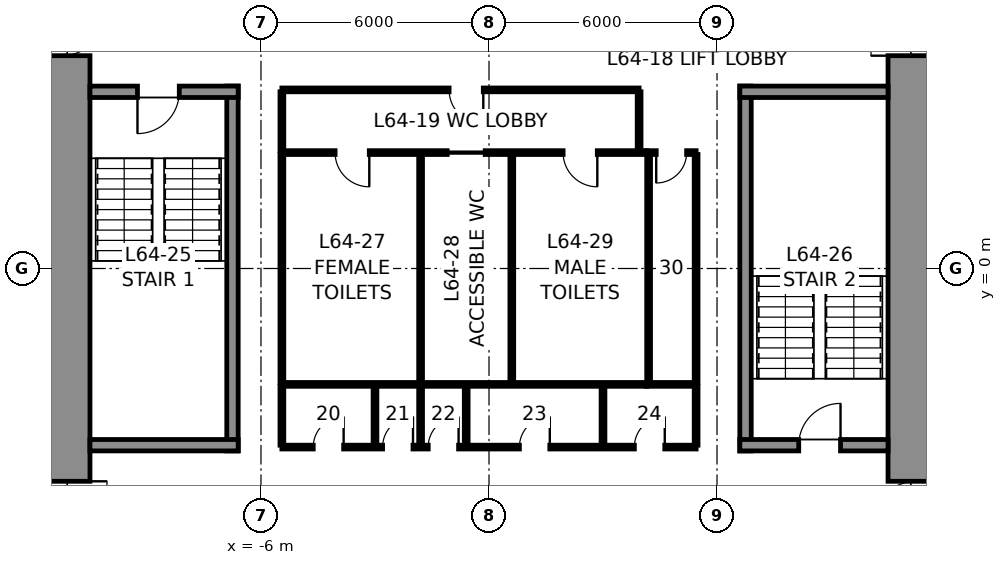
"""IFC4 building model, lengths in metres.
Left out: names, types, materials, properties, quantities, classifications, styles, units other than length and angle.
Written with IfcOpenShell. Run it as: python <this file> out.ifc"""

import sys

from ifc_helpers import new_model, si_unit, direction, frame, frame_2d, origin, place, context, subcontext, project, spatial, rectangle, extrude, element, fill, save


model = new_model("IFC4")
c1 = context("Model", 3, precision=1e-05, world=origin(), true_north=direction((0.0, 1.0)))
c2 = subcontext(c1, "Body", "Model", "MODEL_VIEW")
j1 = project(units=[si_unit("LENGTHUNIT", "METRE"), si_unit("PLANEANGLEUNIT", "RADIAN")], contexts=[c1])
p1 = place(None, origin())
s1 = spatial("IfcSite", under=j1, at=p1, CompositionType="ELEMENT")
p2 = place(p1, origin())
s2 = spatial("IfcBuilding", under=s1, at=p2, CompositionType="ELEMENT")
p3 = place(p2, frame((0.0, 0.0, 285.8)))
s3 = spatial("IfcBuildingStorey", under=s2, at=p3, CompositionType="ELEMENT", Elevation=285.8)
p4 = place(p3, frame((11.25, 10.5, 0.0), z_axis=(0.0, 0.0, 1.0), x_axis=(0.0, -1.0, 0.0)))
e1 = element("IfcWall", 1, at=p4, inside=s3, PredefinedType="SHEAR", context=c2, shape_type="SweptSolid", body=[
    extrude(rectangle(XDim=21.0, YDim=1.5, at=frame_2d((10.5, 0.0))), origin(), (0.0, 0.0, 1.0), 4.0),
])
p5 = place(p4, frame((3.7, 0.0, 0.0)))
e2 = element("IfcOpeningElement", 2, at=p5, cuts=e1, PredefinedType="OPENING", context=c2, shape_type="SweptSolid", body=[
    extrude(rectangle(XDim=1.2, YDim=2.3, at=frame_2d((0.6, 1.15))), frame((0.0, 0.76, 0.0), z_axis=(0.0, -1.0, 0.0), x_axis=(1.0, 0.0, 0.0)), (0.0, 0.0, 1.0), 1.52),
])
p6 = place(p4, frame((16.1, 0.0, 0.0)))
e3 = element("IfcOpeningElement", 3, at=p6, cuts=e1, PredefinedType="OPENING", context=c2, shape_type="SweptSolid", body=[
    extrude(rectangle(XDim=1.2, YDim=2.3, at=frame_2d((0.6, 1.15))), frame((0.0, 0.76, 0.0), z_axis=(0.0, -1.0, 0.0), x_axis=(1.0, 0.0, 0.0)), (0.0, 0.0, 1.0), 1.52),
])
p7 = place(p3, frame((-11.25, -10.5, 0.0), z_axis=(0.0, 0.0, 1.0), x_axis=(0.0, 1.0, 0.0)))
e4 = element("IfcWall", 4, at=p7, inside=s3, PredefinedType="SHEAR", context=c2, shape_type="SweptSolid", body=[
    extrude(rectangle(XDim=21.0, YDim=1.5, at=frame_2d((10.5, 0.0))), origin(), (0.0, 0.0, 1.0), 4.0),
])
p8 = place(p7, frame((16.1, 0.0, 0.0)))
e5 = element("IfcOpeningElement", 5, at=p8, cuts=e4, PredefinedType="OPENING", context=c2, shape_type="SweptSolid", body=[
    extrude(rectangle(XDim=1.2, YDim=2.3, at=frame_2d((0.6, 1.15))), frame((0.0, 0.76, 0.0), z_axis=(0.0, -1.0, 0.0), x_axis=(1.0, 0.0, 0.0)), (0.0, 0.0, 1.0), 1.52),
])
p9 = place(p7, frame((3.7, 0.0, 0.0)))
e6 = element("IfcOpeningElement", 6, at=p9, cuts=e4, PredefinedType="OPENING", context=c2, shape_type="SweptSolid", body=[
    extrude(rectangle(XDim=1.2, YDim=2.3, at=frame_2d((0.6, 1.15))), frame((0.0, 0.76, 0.0), z_axis=(0.0, -1.0, 0.0), x_axis=(1.0, 0.0, 0.0)), (0.0, 0.0, 1.0), 1.52),
])
p10 = place(p3, frame((-6.75, -4.8, 0.0), z_axis=(0.0, 0.0, 1.0), x_axis=(0.0, 1.0, 0.0)))
e7 = element("IfcWall", 7, at=p10, inside=s3, PredefinedType="SOLIDWALL", context=c2, shape_type="SweptSolid", body=[
    extrude(rectangle(XDim=9.6, YDim=0.3, at=frame_2d((4.8, 0.0))), origin(), (0.0, 0.0, 1.0), 3.75),
])
p11 = place(p3, frame((-10.5, 4.65, 0.0), z_axis=(0.0, 0.0, 1.0), x_axis=(1.0, 0.0, 0.0)))
e8 = element("IfcWall", 8, at=p11, inside=s3, PredefinedType="SOLIDWALL", context=c2, shape_type="SweptSolid", body=[
    extrude(rectangle(XDim=3.9, YDim=0.3, at=frame_2d((1.95, 0.0))), origin(), (0.0, 0.0, 1.0), 3.75),
])
p12 = place(p11, frame((1.25, 0.0, 0.0)))
e9 = element("IfcOpeningElement", 9, at=p12, cuts=e8, PredefinedType="OPENING", context=c2, shape_type="SweptSolid", body=[
    extrude(rectangle(XDim=1.1, YDim=2.3, at=frame_2d((0.55, 1.15))), frame((0.0, 0.16, 0.0), z_axis=(0.0, -1.0, 0.0), x_axis=(1.0, 0.0, 0.0)), (0.0, 0.0, 1.0), 0.32),
])
p13 = place(p3, frame((-6.6, -4.65, 0.0), z_axis=(0.0, 0.0, 1.0), x_axis=(-1.0, 0.0, 0.0)))
e10 = element("IfcWall", 10, at=p13, inside=s3, PredefinedType="SOLIDWALL", context=c2, shape_type="SweptSolid", body=[
    extrude(rectangle(XDim=3.9, YDim=0.3, at=frame_2d((1.95, 0.0))), origin(), (0.0, 0.0, 1.0), 3.75),
])
p14 = place(p3, frame((6.75, -4.8, 0.0), z_axis=(0.0, 0.0, 1.0), x_axis=(0.0, 1.0, 0.0)))
e11 = element("IfcWall", 11, at=p14, inside=s3, PredefinedType="SOLIDWALL", context=c2, shape_type="SweptSolid", body=[
    extrude(rectangle(XDim=9.6, YDim=0.3, at=frame_2d((4.8, 0.0))), origin(), (0.0, 0.0, 1.0), 3.75),
])
p15 = place(p3, frame((6.6, 4.65, 0.0), z_axis=(0.0, 0.0, 1.0), x_axis=(1.0, 0.0, 0.0)))
e12 = element("IfcWall", 12, at=p15, inside=s3, PredefinedType="SOLIDWALL", context=c2, shape_type="SweptSolid", body=[
    extrude(rectangle(XDim=3.9, YDim=0.3, at=frame_2d((1.95, 0.0))), origin(), (0.0, 0.0, 1.0), 3.75),
])
p16 = place(p3, frame((10.5, -4.65, 0.0), z_axis=(0.0, 0.0, 1.0), x_axis=(-1.0, 0.0, 0.0)))
e13 = element("IfcWall", 13, at=p16, inside=s3, PredefinedType="SOLIDWALL", context=c2, shape_type="SweptSolid", body=[
    extrude(rectangle(XDim=3.9, YDim=0.3, at=frame_2d((1.95, 0.0))), origin(), (0.0, 0.0, 1.0), 3.75),
])
p17 = place(p16, frame((1.25, 0.0, 0.0)))
e14 = element("IfcOpeningElement", 14, at=p17, cuts=e13, PredefinedType="OPENING", context=c2, shape_type="SweptSolid", body=[
    extrude(rectangle(XDim=1.1, YDim=2.3, at=frame_2d((0.55, 1.15))), frame((0.0, 0.16, 0.0), z_axis=(0.0, -1.0, 0.0), x_axis=(1.0, 0.0, 0.0)), (0.0, 0.0, 1.0), 0.32),
])
p18 = place(p3, frame((-5.45, 3.05, 0.0), z_axis=(0.0, 0.0, 1.0), x_axis=(1.0, 0.0, 0.0)))
e15 = element("IfcWall", 15, at=p18, inside=s3, PredefinedType="PARTITIONING", context=c2, shape_type="SweptSolid", body=[
    extrude(rectangle(XDim=9.6, YDim=0.1, at=frame_2d((4.8, 0.0))), origin(), (0.0, 0.0, 1.0), 3.75),
])
p19 = place(p18, frame((1.4, 0.0, 0.0)))
e16 = element("IfcOpeningElement", 16, at=p19, cuts=e15, PredefinedType="OPENING", context=c2, shape_type="SweptSolid", body=[
    extrude(rectangle(XDim=0.9, YDim=2.3, at=frame_2d((0.45, 1.15))), frame((0.0, 0.06, 0.0), z_axis=(0.0, -1.0, 0.0), x_axis=(1.0, 0.0, 0.0)), (0.0, 0.0, 1.0), 0.12),
])
p20 = place(p18, frame((4.35, 0.0, 0.0)))
e17 = element("IfcOpeningElement", 17, at=p20, cuts=e15, PredefinedType="OPENING", context=c2, shape_type="SweptSolid", body=[
    extrude(rectangle(XDim=1.0, YDim=2.3, at=frame_2d((0.5, 1.15))), frame((0.0, 0.06, 0.0), z_axis=(0.0, -1.0, 0.0), x_axis=(1.0, 0.0, 0.0)), (0.0, 0.0, 1.0), 0.12),
])
p21 = place(p18, frame((7.4, 0.0, 0.0)))
e18 = element("IfcOpeningElement", 18, at=p21, cuts=e15, PredefinedType="OPENING", context=c2, shape_type="SweptSolid", body=[
    extrude(rectangle(XDim=0.9, YDim=2.3, at=frame_2d((0.45, 1.15))), frame((0.0, 0.06, 0.0), z_axis=(0.0, -1.0, 0.0), x_axis=(1.0, 0.0, 0.0)), (0.0, 0.0, 1.0), 0.12),
])
p22 = place(p3, frame((4.15, 3.05, 0.0), z_axis=(0.0, 0.0, 1.0), x_axis=(1.0, 0.0, 0.0)))
e19 = element("IfcWall", 19, at=p22, inside=s3, PredefinedType="PARTITIONING", context=c2, shape_type="SweptSolid", body=[
    extrude(rectangle(XDim=1.3, YDim=0.1, at=frame_2d((0.65, 0.0))), origin(), (0.0, 0.0, 1.0), 3.75),
])
p23 = place(p22, frame((0.25, 0.0, 0.0)))
e20 = element("IfcOpeningElement", 20, at=p23, cuts=e19, PredefinedType="OPENING", context=c2, shape_type="SweptSolid", body=[
    extrude(rectangle(XDim=0.8, YDim=2.3, at=frame_2d((0.4, 1.15))), frame((0.0, 0.06, 0.0), z_axis=(0.0, -1.0, 0.0), x_axis=(1.0, 0.0, 0.0)), (0.0, 0.0, 1.0), 0.12),
])
p24 = place(p3, frame((4.15, -3.05, 0.0), z_axis=(0.0, 0.0, 1.0), x_axis=(-1.0, 0.0, 0.0)))
e21 = element("IfcWall", 21, at=p24, inside=s3, PredefinedType="PARTITIONING", context=c2, shape_type="SweptSolid", body=[
    extrude(rectangle(XDim=9.6, YDim=0.1, at=frame_2d((4.8, 0.0))), origin(), (0.0, 0.0, 1.0), 3.75),
])
p25 = place(p3, frame((5.45, -3.05, 0.0), z_axis=(0.0, 0.0, 1.0), x_axis=(-1.0, 0.0, 0.0)))
e22 = element("IfcWall", 22, at=p25, inside=s3, PredefinedType="PARTITIONING", context=c2, shape_type="SweptSolid", body=[
    extrude(rectangle(XDim=1.3, YDim=0.1, at=frame_2d((0.65, 0.0))), origin(), (0.0, 0.0, 1.0), 3.75),
])
for number, where, z_axis, x_axis in (
    (23, (5.45, 3.0, 0.0), (0.0, 0.0, 1.0), (0.0, -1.0, 0.0)),
    (24, (-5.45, -3.0, 0.0), (0.0, 0.0, 1.0), (0.0, 1.0, 0.0)),
    (25, (-1.8, -3.0, 0.0), (0.0, 0.0, 1.0), (0.0, 1.0, 0.0)),
    (26, (0.6, -3.0, 0.0), (0.0, 0.0, 1.0), (0.0, 1.0, 0.0)),
    (27, (4.2, -3.0, 0.0), (0.0, 0.0, 1.0), (0.0, 1.0, 0.0)),
):
    element("IfcWall", number, at=place(p3, frame(where, z_axis=z_axis, x_axis=x_axis)), inside=s3, PredefinedType="PARTITIONING", context=c2, shape_type="SweptSolid", body=[
        extrude(rectangle(XDim=6.0, YDim=0.1, at=frame_2d((3.0, 0.0))), origin(), (0.0, 0.0, 1.0), 3.75),
    ])
p26 = place(p3, frame((-5.45, 4.7, 0.0), z_axis=(0.0, 0.0, 1.0), x_axis=(1.0, 0.0, 0.0)))
e28 = element("IfcWall", 28, at=p26, inside=s3, PredefinedType="PARTITIONING", context=c2, shape_type="SweptSolid", body=[
    extrude(rectangle(XDim=9.4, YDim=0.1, at=frame_2d((4.7, 0.0))), origin(), (0.0, 0.0, 1.0), 3.75),
])
p27 = place(p26, frame((4.4, 0.0, 0.0)))
e29 = element("IfcOpeningElement", 29, at=p27, cuts=e28, PredefinedType="OPENING", context=c2, shape_type="SweptSolid", body=[
    extrude(rectangle(XDim=0.9, YDim=2.3, at=frame_2d((0.45, 1.15))), frame((0.0, 0.06, 0.0), z_axis=(0.0, -1.0, 0.0), x_axis=(1.0, 0.0, 0.0)), (0.0, 0.0, 1.0), 0.12),
])
for number, where, z_axis, x_axis in (
    (30, (-5.45, 3.1, 0.0), (0.0, 0.0, 1.0), (0.0, 1.0, 0.0)),
    (31, (3.95, 3.1, 0.0), (0.0, 0.0, 1.0), (0.0, 1.0, 0.0)),
):
    element("IfcWall", number, at=place(p3, frame(where, z_axis=z_axis, x_axis=x_axis)), inside=s3, PredefinedType="PARTITIONING", context=c2, shape_type="SweptSolid", body=[
        extrude(rectangle(XDim=1.55, YDim=0.1, at=frame_2d((0.775, 0.0))), origin(), (0.0, 0.0, 1.0), 3.75),
    ])
p28 = place(p3, frame((5.45, -4.7, 0.0), z_axis=(0.0, 0.0, 1.0), x_axis=(-1.0, 0.0, 0.0)))
e32 = element("IfcWall", 32, at=p28, inside=s3, PredefinedType="PARTITIONING", context=c2, shape_type="SweptSolid", body=[
    extrude(rectangle(XDim=10.9, YDim=0.1, at=frame_2d((5.45, 0.0))), origin(), (0.0, 0.0, 1.0), 3.75),
])
p29 = place(p28, frame((9.275, 0.0, 0.0)))
e33 = element("IfcOpeningElement", 33, at=p29, cuts=e32, PredefinedType="OPENING", context=c2, shape_type="SweptSolid", body=[
    extrude(rectangle(XDim=0.8, YDim=2.3, at=frame_2d((0.4, 1.15))), frame((0.0, 0.06, 0.0), z_axis=(0.0, -1.0, 0.0), x_axis=(1.0, 0.0, 0.0)), (0.0, 0.0, 1.0), 0.12),
])
p30 = place(p28, frame((7.45, 0.0, 0.0)))
e34 = element("IfcOpeningElement", 34, at=p30, cuts=e32, PredefinedType="OPENING", context=c2, shape_type="SweptSolid", body=[
    extrude(rectangle(XDim=0.8, YDim=2.3, at=frame_2d((0.4, 1.15))), frame((0.0, 0.06, 0.0), z_axis=(0.0, -1.0, 0.0), x_axis=(1.0, 0.0, 0.0)), (0.0, 0.0, 1.0), 0.12),
])
p31 = place(p28, frame((6.25, 0.0, 0.0)))
e35 = element("IfcOpeningElement", 35, at=p31, cuts=e32, PredefinedType="OPENING", context=c2, shape_type="SweptSolid", body=[
    extrude(rectangle(XDim=0.8, YDim=2.3, at=frame_2d((0.4, 1.15))), frame((0.0, 0.06, 0.0), z_axis=(0.0, -1.0, 0.0), x_axis=(1.0, 0.0, 0.0)), (0.0, 0.0, 1.0), 0.12),
])
p32 = place(p28, frame((3.85, 0.0, 0.0)))
e36 = element("IfcOpeningElement", 36, at=p32, cuts=e32, PredefinedType="OPENING", context=c2, shape_type="SweptSolid", body=[
    extrude(rectangle(XDim=0.8, YDim=2.3, at=frame_2d((0.4, 1.15))), frame((0.0, 0.06, 0.0), z_axis=(0.0, -1.0, 0.0), x_axis=(1.0, 0.0, 0.0)), (0.0, 0.0, 1.0), 0.12),
])
p33 = place(p28, frame((0.825, 0.0, 0.0)))
e37 = element("IfcOpeningElement", 37, at=p33, cuts=e32, PredefinedType="OPENING", context=c2, shape_type="SweptSolid", body=[
    extrude(rectangle(XDim=0.8, YDim=2.3, at=frame_2d((0.4, 1.15))), frame((0.0, 0.06, 0.0), z_axis=(0.0, -1.0, 0.0), x_axis=(1.0, 0.0, 0.0)), (0.0, 0.0, 1.0), 0.12),
])
for number, where, z_axis, x_axis in (
    (38, (-5.45, -3.1, 0.0), (0.0, 0.0, 1.0), (0.0, -1.0, 0.0)),
    (39, (5.45, -3.1, 0.0), (0.0, 0.0, 1.0), (0.0, -1.0, 0.0)),
    (40, (-3.0, -3.1, 0.0), (0.0, 0.0, 1.0), (0.0, -1.0, 0.0)),
    (41, (-1.8, -3.1, 0.0), (0.0, 0.0, 1.0), (0.0, -1.0, 0.0)),
    (42, (-0.6, -3.1, 0.0), (0.0, 0.0, 1.0), (0.0, -1.0, 0.0)),
    (43, (3.0, -3.1, 0.0), (0.0, 0.0, 1.0), (0.0, -1.0, 0.0)),
):
    element("IfcWall", number, at=place(p3, frame(where, z_axis=z_axis, x_axis=x_axis)), inside=s3, PredefinedType="PARTITIONING", context=c2, shape_type="SweptSolid", body=[
        extrude(rectangle(XDim=1.55, YDim=0.1, at=frame_2d((0.775, 0.0))), origin(), (0.0, 0.0, 1.0), 3.75),
    ])
p34 = place(p12, frame((1.1, 0.0, 0.0), z_axis=(0.0, 0.0, 1.0), x_axis=(-1.0, 0.0, 0.0)))
e44 = element("IfcDoor", 44, at=p34, inside=s3, OperationType="SINGLE_SWING_RIGHT", PredefinedType="DOOR", context=c2, shape_type="SweptSolid", body=[
    extrude(rectangle(XDim=1.1, YDim=2.3, at=frame_2d((0.55, 1.15))), frame((0.0, 0.025, 0.0), z_axis=(0.0, -1.0, 0.0), x_axis=(1.0, 0.0, 0.0)), (0.0, 0.0, 1.0), 0.05),
])
fill(e9, e44)
p35 = place(p17, frame((1.1, 0.0, 0.0), z_axis=(0.0, 0.0, 1.0), x_axis=(-1.0, 0.0, 0.0)))
e45 = element("IfcDoor", 45, at=p35, inside=s3, OperationType="SINGLE_SWING_RIGHT", PredefinedType="DOOR", context=c2, shape_type="SweptSolid", body=[
    extrude(rectangle(XDim=1.1, YDim=2.3, at=frame_2d((0.55, 1.15))), frame((0.0, 0.025, 0.0), z_axis=(0.0, -1.0, 0.0), x_axis=(1.0, 0.0, 0.0)), (0.0, 0.0, 1.0), 0.05),
])
fill(e14, e45)
p36 = place(p19, frame((0.9, 0.0, 0.0), z_axis=(0.0, 0.0, 1.0), x_axis=(-1.0, 0.0, 0.0)))
e46 = element("IfcDoor", 46, at=p36, inside=s3, OperationType="SINGLE_SWING_LEFT", PredefinedType="DOOR", context=c2, shape_type="SweptSolid", body=[
    extrude(rectangle(XDim=0.9, YDim=2.3, at=frame_2d((0.45, 1.15))), frame((0.0, 0.025, 0.0), z_axis=(0.0, -1.0, 0.0), x_axis=(1.0, 0.0, 0.0)), (0.0, 0.0, 1.0), 0.05),
])
fill(e16, e46)
p37 = place(p20, frame((1.0, 0.0, 0.0), z_axis=(0.0, 0.0, 1.0), x_axis=(-1.0, 0.0, 0.0)))
e47 = element("IfcDoor", 47, at=p37, inside=s3, OperationType="SLIDING_TO_LEFT", PredefinedType="DOOR", context=c2, shape_type="SweptSolid", body=[
    extrude(rectangle(XDim=1.0, YDim=2.3, at=frame_2d((0.5, 1.15))), frame((0.0, 0.025, 0.0), z_axis=(0.0, -1.0, 0.0), x_axis=(1.0, 0.0, 0.0)), (0.0, 0.0, 1.0), 0.05),
])
fill(e17, e47)
p38 = place(p21, frame((0.9, 0.0, 0.0), z_axis=(0.0, 0.0, 1.0), x_axis=(-1.0, 0.0, 0.0)))
e48 = element("IfcDoor", 48, at=p38, inside=s3, OperationType="SINGLE_SWING_LEFT", PredefinedType="DOOR", context=c2, shape_type="SweptSolid", body=[
    extrude(rectangle(XDim=0.9, YDim=2.3, at=frame_2d((0.45, 1.15))), frame((0.0, 0.025, 0.0), z_axis=(0.0, -1.0, 0.0), x_axis=(1.0, 0.0, 0.0)), (0.0, 0.0, 1.0), 0.05),
])
fill(e18, e48)
p39 = place(p23, frame((0.8, 0.0, 0.0), z_axis=(0.0, 0.0, 1.0), x_axis=(-1.0, 0.0, 0.0)))
e49 = element("IfcDoor", 49, at=p39, inside=s3, OperationType="SINGLE_SWING_RIGHT", PredefinedType="DOOR", context=c2, shape_type="SweptSolid", body=[
    extrude(rectangle(XDim=0.8, YDim=2.3, at=frame_2d((0.4, 1.15))), frame((0.0, 0.025, 0.0), z_axis=(0.0, -1.0, 0.0), x_axis=(1.0, 0.0, 0.0)), (0.0, 0.0, 1.0), 0.05),
])
fill(e20, e49)
p40 = place(p27, frame((0.9, 0.0, 0.0), z_axis=(0.0, 0.0, 1.0), x_axis=(-1.0, 0.0, 0.0)))
e50 = element("IfcDoor", 50, at=p40, inside=s3, OperationType="SINGLE_SWING_LEFT", PredefinedType="DOOR", context=c2, shape_type="SweptSolid", body=[
    extrude(rectangle(XDim=0.9, YDim=2.3, at=frame_2d((0.45, 1.15))), frame((0.0, 0.025, 0.0), z_axis=(0.0, -1.0, 0.0), x_axis=(1.0, 0.0, 0.0)), (0.0, 0.0, 1.0), 0.05),
])
fill(e29, e50)
p41 = place(p29, frame((0.8, 0.0, 0.0), z_axis=(0.0, 0.0, 1.0), x_axis=(-1.0, 0.0, 0.0)))
e51 = element("IfcDoor", 51, at=p41, inside=s3, OperationType="SINGLE_SWING_RIGHT", PredefinedType="DOOR", context=c2, shape_type="SweptSolid", body=[
    extrude(rectangle(XDim=0.8, YDim=2.3, at=frame_2d((0.4, 1.15))), frame((0.0, 0.025, 0.0), z_axis=(0.0, -1.0, 0.0), x_axis=(1.0, 0.0, 0.0)), (0.0, 0.0, 1.0), 0.05),
])
fill(e33, e51)
p42 = place(p30, frame((0.8, 0.0, 0.0), z_axis=(0.0, 0.0, 1.0), x_axis=(-1.0, 0.0, 0.0)))
e52 = element("IfcDoor", 52, at=p42, inside=s3, OperationType="SINGLE_SWING_RIGHT", PredefinedType="DOOR", context=c2, shape_type="SweptSolid", body=[
    extrude(rectangle(XDim=0.8, YDim=2.3, at=frame_2d((0.4, 1.15))), frame((0.0, 0.025, 0.0), z_axis=(0.0, -1.0, 0.0), x_axis=(1.0, 0.0, 0.0)), (0.0, 0.0, 1.0), 0.05),
])
fill(e34, e52)
p43 = place(p31, frame((0.8, 0.0, 0.0), z_axis=(0.0, 0.0, 1.0), x_axis=(-1.0, 0.0, 0.0)))
e53 = element("IfcDoor", 53, at=p43, inside=s3, OperationType="SINGLE_SWING_RIGHT", PredefinedType="DOOR", context=c2, shape_type="SweptSolid", body=[
    extrude(rectangle(XDim=0.8, YDim=2.3, at=frame_2d((0.4, 1.15))), frame((0.0, 0.025, 0.0), z_axis=(0.0, -1.0, 0.0), x_axis=(1.0, 0.0, 0.0)), (0.0, 0.0, 1.0), 0.05),
])
fill(e35, e53)
p44 = place(p32, frame((0.8, 0.0, 0.0), z_axis=(0.0, 0.0, 1.0), x_axis=(-1.0, 0.0, 0.0)))
e54 = element("IfcDoor", 54, at=p44, inside=s3, OperationType="SINGLE_SWING_RIGHT", PredefinedType="DOOR", context=c2, shape_type="SweptSolid", body=[
    extrude(rectangle(XDim=0.8, YDim=2.3, at=frame_2d((0.4, 1.15))), frame((0.0, 0.025, 0.0), z_axis=(0.0, -1.0, 0.0), x_axis=(1.0, 0.0, 0.0)), (0.0, 0.0, 1.0), 0.05),
])
fill(e36, e54)
p45 = place(p33, frame((0.8, 0.0, 0.0), z_axis=(0.0, 0.0, 1.0), x_axis=(-1.0, 0.0, 0.0)))
e55 = element("IfcDoor", 55, at=p45, inside=s3, OperationType="SINGLE_SWING_RIGHT", PredefinedType="DOOR", context=c2, shape_type="SweptSolid", body=[
    extrude(rectangle(XDim=0.8, YDim=2.3, at=frame_2d((0.4, 1.15))), frame((0.0, 0.025, 0.0), z_axis=(0.0, -1.0, 0.0), x_axis=(1.0, 0.0, 0.0)), (0.0, 0.0, 1.0), 0.05),
])
fill(e37, e55)
p46 = place(p8, frame((1.2, 0.0, 0.0), z_axis=(0.0, 0.0, 1.0), x_axis=(-1.0, 0.0, 0.0)))
e56 = element("IfcDoor", 56, at=p46, inside=s3, OperationType="SINGLE_SWING_LEFT", PredefinedType="DOOR", context=c2, shape_type="SweptSolid", body=[
    extrude(rectangle(XDim=1.2, YDim=2.3, at=frame_2d((0.6, 1.15))), frame((0.0, 0.025, 0.0), z_axis=(0.0, -1.0, 0.0), x_axis=(1.0, 0.0, 0.0)), (0.0, 0.0, 1.0), 0.05),
])
fill(e5, e56)
p47 = place(p9, frame((1.2, 0.0, 0.0), z_axis=(0.0, 0.0, 1.0), x_axis=(-1.0, 0.0, 0.0)))
e57 = element("IfcDoor", 57, at=p47, inside=s3, OperationType="SINGLE_SWING_LEFT", PredefinedType="DOOR", context=c2, shape_type="SweptSolid", body=[
    extrude(rectangle(XDim=1.2, YDim=2.3, at=frame_2d((0.6, 1.15))), frame((0.0, 0.025, 0.0), z_axis=(0.0, -1.0, 0.0), x_axis=(1.0, 0.0, 0.0)), (0.0, 0.0, 1.0), 0.05),
])
fill(e6, e57)
p48 = place(p5, frame((1.2, 0.0, 0.0), z_axis=(0.0, 0.0, 1.0), x_axis=(-1.0, 0.0, 0.0)))
e58 = element("IfcDoor", 58, at=p48, inside=s3, OperationType="SINGLE_SWING_LEFT", PredefinedType="DOOR", context=c2, shape_type="SweptSolid", body=[
    extrude(rectangle(XDim=1.2, YDim=2.3, at=frame_2d((0.6, 1.15))), frame((0.0, 0.025, 0.0), z_axis=(0.0, -1.0, 0.0), x_axis=(1.0, 0.0, 0.0)), (0.0, 0.0, 1.0), 0.05),
])
fill(e2, e58)
p49 = place(p6, frame((1.2, 0.0, 0.0), z_axis=(0.0, 0.0, 1.0), x_axis=(-1.0, 0.0, 0.0)))
e59 = element("IfcDoor", 59, at=p49, inside=s3, OperationType="SINGLE_SWING_LEFT", PredefinedType="DOOR", context=c2, shape_type="SweptSolid", body=[
    extrude(rectangle(XDim=1.2, YDim=2.3, at=frame_2d((0.6, 1.15))), frame((0.0, 0.025, 0.0), z_axis=(0.0, -1.0, 0.0), x_axis=(1.0, 0.0, 0.0)), (0.0, 0.0, 1.0), 0.05),
])
fill(e3, e59)
save(model, sys.argv[1])
